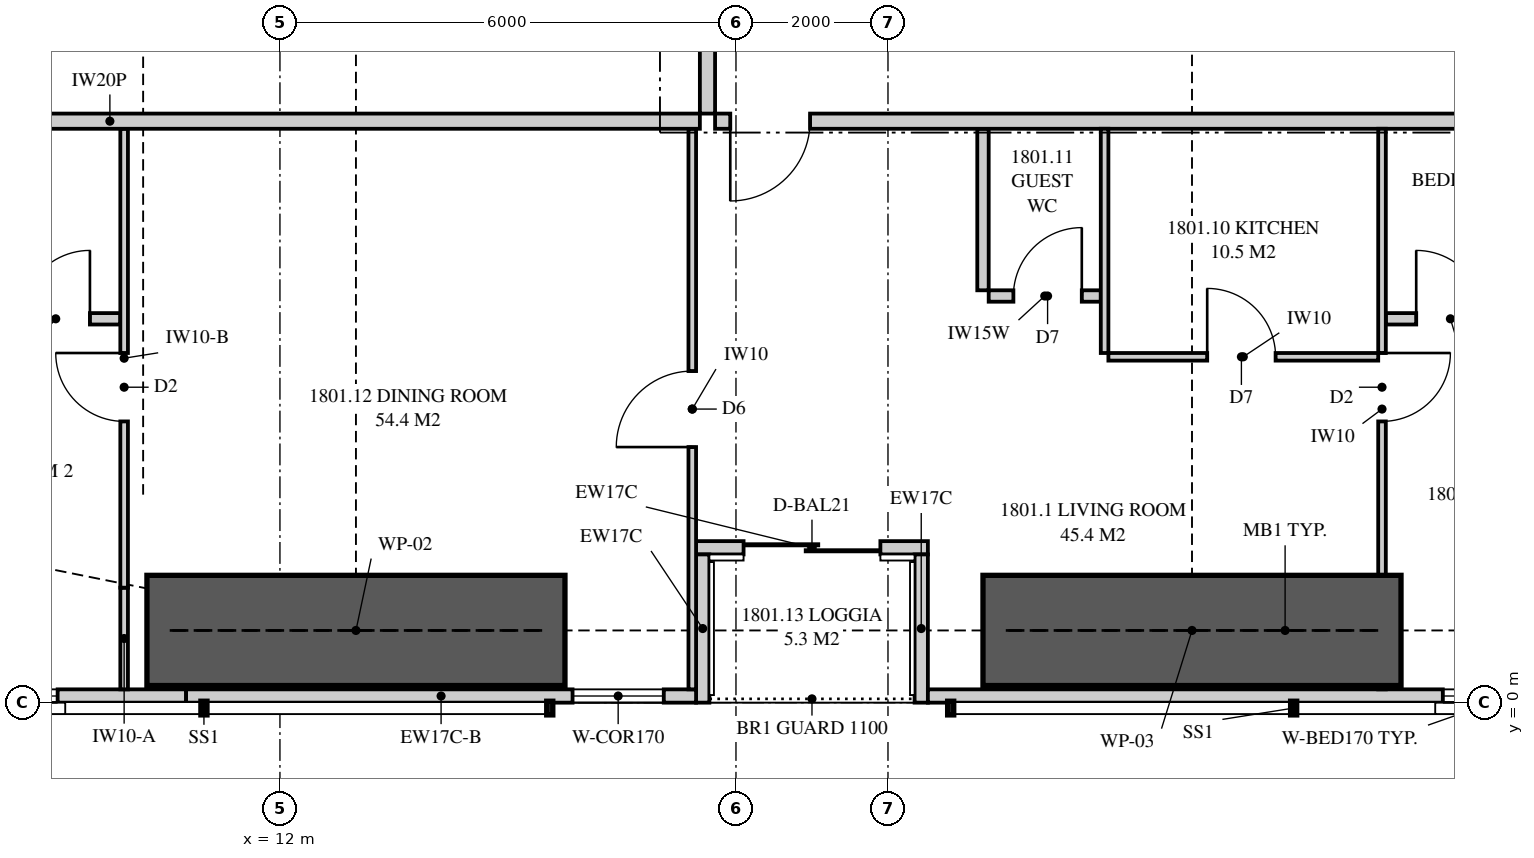
"""IFC4 building model, lengths in metres.
Left out: names, types, materials, properties, quantities, classifications, styles, units other than length and angle.
Written with IfcOpenShell. Run it as: python <this file> out.ifc"""

import sys

from ifc_helpers import new_model, si_unit, direction, frame, frame_2d, origin, place, context, subcontext, project, spatial, polyline, rectangle, outline, extrude, element, fill, save


model = new_model("IFC4")
c1 = context("Model", 3, precision=1e-05, world=origin(), true_north=direction((0.0, 1.0)))
c2 = subcontext(c1, "Body", "Model", "MODEL_VIEW")
j1 = project(units=[si_unit("LENGTHUNIT", "METRE"), si_unit("PLANEANGLEUNIT", "RADIAN")], contexts=[c1])
p1 = place(None, origin())
s1 = spatial("IfcSite", under=j1, at=p1, CompositionType="ELEMENT")
p2 = place(p1, origin())
s2 = spatial("IfcBuilding", under=s1, at=p2, CompositionType="ELEMENT")
p3 = place(p2, frame((0.0, 0.0, 67.9)))
s3 = spatial("IfcBuildingStorey", under=s2, at=p3, CompositionType="ELEMENT", Elevation=67.9)
p4 = place(p3, frame((5.051, 0.087, 0.0), z_axis=(0.0, 0.0, 1.0), x_axis=(1.0, 0.0, 0.0)))
e1 = element("IfcWall", 1, at=p4, inside=s3, PredefinedType="SOLIDWALL", context=c2, shape_type="SweptSolid", body=[
    extrude(rectangle(XDim=5.714, YDim=0.175, at=frame_2d((2.857, 0.0))), origin(), (0.0, 0.0, 1.0), 3.11),
])
p5 = place(p4, frame((2.224, 0.0, 0.4)))
e2 = element("IfcOpeningElement", 2, at=p5, cuts=e1, PredefinedType="OPENING", context=c2, shape_type="SweptSolid", body=[
    extrude(rectangle(XDim=1.8, YDim=1.7, at=frame_2d((0.9, 0.85))), frame((0.0, 0.097, 0.0), z_axis=(0.0, -1.0, 0.0), x_axis=(1.0, 0.0, 0.0)), (0.0, 0.0, 1.0), 0.195),
])
p6 = place(p3, frame((10.765, 0.087, 0.0), z_axis=(0.0, 0.0, 1.0), x_axis=(1.0, 0.0, 0.0)))
e3 = element("IfcWall", 3, at=p6, inside=s3, PredefinedType="SOLIDWALL", context=c2, shape_type="SweptSolid", body=[
    extrude(rectangle(XDim=6.71, YDim=0.175, at=frame_2d((3.355, 0.0))), origin(), (0.0, 0.0, 1.0), 2.15),
])
p7 = place(p6, frame((5.085, 0.0, 0.4)))
e4 = element("IfcOpeningElement", 4, at=p7, cuts=e3, PredefinedType="OPENING", context=c2, shape_type="SweptSolid", body=[
    extrude(rectangle(XDim=1.2, YDim=1.7, at=frame_2d((0.6, 0.85))), frame((0.0, 0.097, 0.0), z_axis=(0.0, -1.0, 0.0), x_axis=(1.0, 0.0, 0.0)), (0.0, 0.0, 1.0), 0.195),
])
p8 = place(p3, frame((20.525, 0.087, 0.0), z_axis=(0.0, 0.0, 1.0), x_axis=(1.0, 0.0, 0.0)))
e5 = element("IfcWall", 5, at=p8, inside=s3, PredefinedType="SOLIDWALL", context=c2, shape_type="SweptSolid", body=[
    extrude(rectangle(XDim=16.71, YDim=0.175, at=frame_2d((8.355, 0.0))), origin(), (0.0, 0.0, 1.0), 2.15),
])
p9 = place(p8, frame((6.775, 0.0, 0.4)))
e6 = element("IfcOpeningElement", 6, at=p9, cuts=e5, PredefinedType="OPENING", context=c2, shape_type="SweptSolid", body=[
    extrude(rectangle(XDim=1.8, YDim=1.7, at=frame_2d((0.9, 0.85))), frame((0.0, 0.097, 0.0), z_axis=(0.0, -1.0, 0.0), x_axis=(1.0, 0.0, 0.0)), (0.0, 0.0, 1.0), 0.195),
])
p10 = place(p8, frame((9.81, 0.0, 0.4)))
e7 = element("IfcOpeningElement", 7, at=p10, cuts=e5, PredefinedType="OPENING", context=c2, shape_type="SweptSolid", body=[
    extrude(rectangle(XDim=1.8, YDim=1.7, at=frame_2d((0.9, 0.85))), frame((0.0, 0.097, 0.0), z_axis=(0.0, -1.0, 0.0), x_axis=(1.0, 0.0, 0.0)), (0.0, 0.0, 1.0), 0.195),
])
p11 = place(p3, frame((17.475, 2.038, 0.0), z_axis=(0.0, 0.0, 1.0), x_axis=(1.0, 0.0, 0.0)))
e8 = element("IfcWall", 8, at=p11, inside=s3, PredefinedType="SOLIDWALL", context=c2, shape_type="SweptSolid", body=[
    extrude(rectangle(XDim=3.05, YDim=0.175, at=frame_2d((1.525, 0.0))), origin(), (0.0, 0.0, 1.0), 2.15),
])
p12 = place(p11, frame((0.625, 0.0, 0.0)))
e9 = element("IfcOpeningElement", 9, at=p12, cuts=e8, PredefinedType="OPENING", context=c2, shape_type="SweptSolid", body=[
    extrude(rectangle(XDim=1.8, YDim=2.1, at=frame_2d((0.9, 1.05))), frame((0.0, 0.097, 0.0), z_axis=(0.0, -1.0, 0.0), x_axis=(1.0, 0.0, 0.0)), (0.0, 0.0, 1.0), 0.195),
])
for number, where, z_axis, x_axis in (
    (10, (17.562, 0.0, 0.0), (0.0, 0.0, 1.0), (0.0, 1.0, 0.0)),
    (11, (20.438, 0.0, 0.0), (0.0, 0.0, 1.0), (0.0, 1.0, 0.0)),
):
    element("IfcWall", number, at=place(p3, frame(where, z_axis=z_axis, x_axis=x_axis)), inside=s3, PredefinedType="SOLIDWALL", context=c2, shape_type="SweptSolid", body=[
        extrude(rectangle(XDim=1.95, YDim=0.175, at=frame_2d((0.975, 0.0))), origin(), (0.0, 0.0, 1.0), 2.15),
    ])
p13 = place(p3, frame((17.725, 7.65, 0.0), z_axis=(0.0, 0.0, 1.0), x_axis=(1.0, 0.0, 0.0)))
e12 = element("IfcWall", 12, at=p13, inside=s3, PredefinedType="PARTITIONING", context=c2, shape_type="SweptSolid", body=[
    extrude(outline(polyline([(0.0, 0.0), (16.075, 0.0), (16.075, 3.11), (6.612, 3.11), (6.612, 2.541), (5.938, 2.541), (5.938, 3.11), (0.0, 3.11), (0.0, 0.0)])), frame((0.0, 0.1, 0.0), z_axis=(0.0, -1.0, 0.0), x_axis=(1.0, 0.0, 0.0)), (0.0, 0.0, 1.0), 0.2),
])
p14 = place(p13, frame((0.2, 0.0, 0.0)))
e13 = element("IfcOpeningElement", 13, at=p14, cuts=e12, PredefinedType="OPENING", context=c2, shape_type="SweptSolid", body=[
    extrude(rectangle(XDim=1.05, YDim=2.2, at=frame_2d((0.525, 1.1))), frame((0.0, 0.11, 0.0), z_axis=(0.0, -1.0, 0.0), x_axis=(1.0, 0.0, 0.0)), (0.0, 0.0, 1.0), 0.22),
])
p15 = place(p3, frame((9.95, 0.175, 0.0), z_axis=(0.0, 0.0, 1.0), x_axis=(0.0, 1.0, 0.0)))
e14 = element("IfcWall", 14, at=p15, inside=s3, PredefinedType="PARTITIONING", context=c2, shape_type="SweptSolid", body=[
    extrude(outline(polyline([(0.0, 0.0), (1.338, 0.0), (1.338, 2.15), (0.103, 2.15), (0.103, 3.11), (0.0, 3.11), (0.0, 0.0)])), frame((0.0, 0.05, 0.0), z_axis=(0.0, -1.0, 0.0), x_axis=(1.0, 0.0, 0.0)), (0.0, 0.0, 1.0), 0.1),
])
p16 = place(p3, frame((9.95, 1.513, 0.0), z_axis=(0.0, 0.0, 1.0), x_axis=(0.0, 1.0, 0.0)))
e15 = element("IfcWall", 15, at=p16, inside=s3, PredefinedType="PARTITIONING", context=c2, shape_type="SweptSolid", body=[
    extrude(outline(polyline([(0.0, 0.0), (6.037, 0.0), (6.037, 2.51), (1.335, 2.51), (1.335, 2.15), (0.0, 2.15), (0.0, 0.0)])), frame((0.0, 0.05, 0.0), z_axis=(0.0, -1.0, 0.0), x_axis=(1.0, 0.0, 0.0)), (0.0, 0.0, 1.0), 0.1),
])
p17 = place(p16, frame((2.188, 0.0, 0.0)))
e16 = element("IfcOpeningElement", 16, at=p17, cuts=e15, PredefinedType="OPENING", context=c2, shape_type="SweptSolid", body=[
    extrude(rectangle(XDim=0.9, YDim=2.1, at=frame_2d((0.45, 1.05))), frame((0.0, 0.06, 0.0), z_axis=(0.0, -1.0, 0.0), x_axis=(1.0, 0.0, 0.0)), (0.0, 0.0, 1.0), 0.12),
])
p18 = place(p3, frame((26.5, 0.175, 0.0), z_axis=(0.0, 0.0, 1.0), x_axis=(0.0, 1.0, 0.0)))
e17 = element("IfcWall", 17, at=p18, inside=s3, PredefinedType="PARTITIONING", context=c2, shape_type="SweptSolid", body=[
    extrude(outline(polyline([(0.0, 0.0), (7.375, 0.0), (7.375, 3.11), (2.035, 3.11), (2.035, 2.15), (0.0, 2.15), (0.0, 3.11), (0.0, 0.0)])), frame((0.0, 0.05, 0.0), z_axis=(0.0, -1.0, 0.0), x_axis=(1.0, 0.0, 0.0)), (0.0, 0.0, 1.0), 0.1),
])
p19 = place(p18, frame((3.525, 0.0, 0.0)))
e18 = element("IfcOpeningElement", 18, at=p19, cuts=e17, PredefinedType="OPENING", context=c2, shape_type="SweptSolid", body=[
    extrude(rectangle(XDim=0.9, YDim=2.1, at=frame_2d((0.45, 1.05))), frame((0.0, 0.06, 0.0), z_axis=(0.0, -1.0, 0.0), x_axis=(1.0, 0.0, 0.0)), (0.0, 0.0, 1.0), 0.12),
])
p20 = place(p3, frame((6.45, 5.05, 0.0), z_axis=(0.0, 0.0, 1.0), x_axis=(1.0, 0.0, 0.0)))
e19 = element("IfcWall", 19, at=p20, inside=s3, PredefinedType="PLUMBINGWALL", context=c2, shape_type="SweptSolid", body=[
    extrude(outline(polyline([(0.0, 0.0), (3.45, 0.0), (3.45, 3.11), (3.45, 2.51), (2.465, 2.51), (2.465, 3.11), (0.0, 3.11), (0.0, 0.0)])), frame((0.0, 0.075, 0.0), z_axis=(0.0, -1.0, 0.0), x_axis=(1.0, 0.0, 0.0)), (0.0, 0.0, 1.0), 0.15),
])
p21 = place(p20, frame((2.15, 0.0, 0.0)))
e20 = element("IfcOpeningElement", 20, at=p21, cuts=e19, PredefinedType="OPENING", context=c2, shape_type="SweptSolid", body=[
    extrude(rectangle(XDim=0.9, YDim=2.1, at=frame_2d((0.45, 1.05))), frame((0.0, 0.085, 0.0), z_axis=(0.0, -1.0, 0.0), x_axis=(1.0, 0.0, 0.0)), (0.0, 0.0, 1.0), 0.17),
])
p22 = place(p3, frame((26.55, 5.05, 0.0), z_axis=(0.0, 0.0, 1.0), x_axis=(1.0, 0.0, 0.0)))
e21 = element("IfcWall", 21, at=p22, inside=s3, PredefinedType="PLUMBINGWALL", context=c2, shape_type="SweptSolid", body=[
    extrude(rectangle(XDim=3.3, YDim=0.15, at=frame_2d((1.65, 0.0))), origin(), (0.0, 0.0, 1.0), 3.11),
])
p23 = place(p22, frame((0.4, 0.0, 0.0)))
e22 = element("IfcOpeningElement", 22, at=p23, cuts=e21, PredefinedType="OPENING", context=c2, shape_type="SweptSolid", body=[
    extrude(rectangle(XDim=0.9, YDim=2.1, at=frame_2d((0.45, 1.05))), frame((0.0, 0.085, 0.0), z_axis=(0.0, -1.0, 0.0), x_axis=(1.0, 0.0, 0.0)), (0.0, 0.0, 1.0), 0.17),
])
p24 = place(p3, frame((22.9, 4.55, 0.0), z_axis=(0.0, 0.0, 1.0), x_axis=(1.0, 0.0, 0.0)))
e23 = element("IfcWall", 23, at=p24, inside=s3, PredefinedType="PARTITIONING", context=c2, shape_type="SweptSolid", body=[
    extrude(outline(polyline([(0.0, 0.0), (3.55, 0.0), (3.55, 3.11), (1.387, 3.11), (1.387, 2.541), (0.812, 2.541), (0.812, 3.11), (0.0, 3.11), (0.0, 0.0)])), frame((0.0, 0.05, 0.0), z_axis=(0.0, -1.0, 0.0), x_axis=(1.0, 0.0, 0.0)), (0.0, 0.0, 1.0), 0.1),
])
p25 = place(p24, frame((1.3, 0.0, 0.0)))
e24 = element("IfcOpeningElement", 24, at=p25, cuts=e23, PredefinedType="OPENING", context=c2, shape_type="SweptSolid", body=[
    extrude(rectangle(XDim=0.9, YDim=2.1, at=frame_2d((0.45, 1.05))), frame((0.0, 0.06, 0.0), z_axis=(0.0, -1.0, 0.0), x_axis=(1.0, 0.0, 0.0)), (0.0, 0.0, 1.0), 0.12),
])
p26 = place(p3, frame((22.85, 4.6, 0.0), z_axis=(0.0, 0.0, 1.0), x_axis=(0.0, 1.0, 0.0)))
e25 = element("IfcWall", 25, at=p26, inside=s3, PredefinedType="PARTITIONING", context=c2, shape_type="SweptSolid", body=[
    extrude(rectangle(XDim=2.95, YDim=0.1, at=frame_2d((1.475, 0.0))), origin(), (0.0, 0.0, 1.0), 3.11),
])
p27 = place(p3, frame((21.325, 5.35, 0.0), z_axis=(0.0, 0.0, 1.0), x_axis=(1.0, 0.0, 0.0)))
e26 = element("IfcWall", 26, at=p27, inside=s3, PredefinedType="PLUMBINGWALL", context=c2, shape_type="SweptSolid", body=[
    extrude(rectangle(XDim=1.475, YDim=0.15, at=frame_2d((0.738, 0.0))), origin(), (0.0, 0.0, 1.0), 3.11),
])
p28 = place(p27, frame((0.325, 0.0, 0.0)))
e27 = element("IfcOpeningElement", 27, at=p28, cuts=e26, PredefinedType="OPENING", context=c2, shape_type="SweptSolid", body=[
    extrude(rectangle(XDim=0.9, YDim=2.1, at=frame_2d((0.45, 1.05))), frame((0.0, 0.085, 0.0), z_axis=(0.0, -1.0, 0.0), x_axis=(1.0, 0.0, 0.0)), (0.0, 0.0, 1.0), 0.17),
])
p29 = place(p3, frame((21.25, 5.425, 0.0), z_axis=(0.0, 0.0, 1.0), x_axis=(0.0, 1.0, 0.0)))
e28 = element("IfcWall", 28, at=p29, inside=s3, PredefinedType="PLUMBINGWALL", context=c2, shape_type="SweptSolid", body=[
    extrude(rectangle(XDim=2.125, YDim=0.15, at=frame_2d((1.062, 0.0))), origin(), (0.0, 0.0, 1.0), 3.11),
])
p30 = place(p3, frame((17.425, 0.175, 0.0), z_axis=(0.0, 0.0, 1.0), x_axis=(0.0, 1.0, 0.0)))
e29 = element("IfcWall", 29, at=p30, inside=s3, PredefinedType="PARTITIONING", context=c2, shape_type="SweptSolid", body=[
    extrude(outline(polyline([(0.0, 0.0), (7.375, 0.0), (7.375, 3.11), (2.035, 3.11), (2.035, 2.15), (0.0, 2.15), (0.0, 3.11), (0.0, 0.0)])), frame((0.0, 0.05, 0.0), z_axis=(0.0, -1.0, 0.0), x_axis=(1.0, 0.0, 0.0)), (0.0, 0.0, 1.0), 0.1),
])
p31 = place(p30, frame((3.188, 0.0, 0.0)))
e30 = element("IfcOpeningElement", 30, at=p31, cuts=e29, PredefinedType="OPENING", context=c2, shape_type="SweptSolid", body=[
    extrude(rectangle(XDim=1.0, YDim=2.1, at=frame_2d((0.5, 1.05))), frame((0.0, 0.06, 0.0), z_axis=(0.0, -1.0, 0.0), x_axis=(1.0, 0.0, 0.0)), (0.0, 0.0, 1.0), 0.12),
])
p32 = place(p3, frame((2.0, 7.65, 0.0), z_axis=(0.0, 0.0, 1.0), x_axis=(1.0, 0.0, 0.0)))
e31 = element("IfcWall", 31, at=p32, inside=s3, PredefinedType="PARTITIONING", context=c2, shape_type="SweptSolid", body=[
    extrude(outline(polyline([(0.0, 0.0), (15.525, 0.0), (15.525, 3.11), (11.337, 3.11), (11.337, 2.541), (10.663, 2.541), (10.663, 3.11), (9.51, 3.11), (9.51, 2.51), (6.89, 2.51), (6.89, 3.11), (3.145, 3.11), (3.145, 2.15), (0.49, 2.15), (0.49, 3.11), (0.0, 3.11), (0.0, 0.0)])), frame((0.0, 0.1, 0.0), z_axis=(0.0, -1.0, 0.0), x_axis=(1.0, 0.0, 0.0)), (0.0, 0.0, 1.0), 0.2),
])
p33 = place(p3, frame((17.625, 7.75, 0.0), z_axis=(0.0, 0.0, 1.0), x_axis=(0.0, 1.0, 0.0)))
e32 = element("IfcWall", 32, at=p33, inside=s3, PredefinedType="PARTITIONING", context=c2, shape_type="SweptSolid", body=[
    extrude(outline(polyline([(0.0, 0.0), (6.15, 0.0), (6.15, 3.11), (5.587, 3.11), (5.587, 2.541), (4.913, 2.541), (4.913, 3.11), (0.0, 3.11), (0.0, 0.0)])), frame((0.0, 0.1, 0.0), z_axis=(0.0, -1.0, 0.0), x_axis=(1.0, 0.0, 0.0)), (0.0, 0.0, 1.0), 0.2),
])
p34 = place(p33, frame((2.175, 0.0, 0.0)))
e33 = element("IfcOpeningElement", 33, at=p34, cuts=e32, PredefinedType="OPENING", context=c2, shape_type="SweptSolid", body=[
    extrude(rectangle(XDim=1.8, YDim=2.1, at=frame_2d((0.9, 1.05))), frame((0.0, 0.11, 0.0), z_axis=(0.0, -1.0, 0.0), x_axis=(1.0, 0.0, 0.0)), (0.0, 0.0, 1.0), 0.22),
])
for number, where, z_axis, x_axis in (
    (34, (10.25, 0.95, 0.0), (0.0, 0.0, 1.0), (1.0, 0.0, 0.0)),
    (35, (21.25, 0.95, 0.0), (0.0, 0.0, 1.0), (1.0, 0.0, 0.0)),
):
    element("IfcWall", number, at=place(p3, frame(where, z_axis=z_axis, x_axis=x_axis)), inside=s3, PredefinedType="SHEAR", context=c2, shape_type="SweptSolid", body=[
        extrude(rectangle(XDim=5.5, YDim=1.45, at=frame_2d((2.75, 0.0))), origin(), (0.0, 0.0, 1.0), 3.35),
    ])
p35 = place(p5, origin())
e36 = element("IfcWindow", 36, at=p35, inside=s3, PartitioningType="SINGLE_PANEL", PredefinedType="WINDOW", context=c2, shape_type="SweptSolid", body=[
    extrude(rectangle(XDim=1.8, YDim=1.7, at=frame_2d((0.9, 0.85))), frame((0.0, 0.03, 0.0), z_axis=(0.0, -1.0, 0.0), x_axis=(1.0, 0.0, 0.0)), (0.0, 0.0, 1.0), 0.06),
])
fill(e2, e36)
p36 = place(p7, origin())
e37 = element("IfcWindow", 37, at=p36, inside=s3, PartitioningType="SINGLE_PANEL", PredefinedType="WINDOW", context=c2, shape_type="SweptSolid", body=[
    extrude(rectangle(XDim=1.2, YDim=1.7, at=frame_2d((0.6, 0.85))), frame((0.0, 0.03, 0.0), z_axis=(0.0, -1.0, 0.0), x_axis=(1.0, 0.0, 0.0)), (0.0, 0.0, 1.0), 0.06),
])
fill(e4, e37)
p37 = place(p12, origin())
e38 = element("IfcDoor", 38, at=p37, inside=s3, OperationType="SLIDING_TO_LEFT", PredefinedType="DOOR", context=c2, shape_type="SweptSolid", body=[
    extrude(rectangle(XDim=1.8, YDim=2.1, at=frame_2d((0.9, 1.05))), frame((0.0, 0.025, 0.0), z_axis=(0.0, -1.0, 0.0), x_axis=(1.0, 0.0, 0.0)), (0.0, 0.0, 1.0), 0.05),
])
fill(e9, e38)
p38 = place(p9, origin())
e39 = element("IfcWindow", 39, at=p38, inside=s3, PartitioningType="SINGLE_PANEL", PredefinedType="WINDOW", context=c2, shape_type="SweptSolid", body=[
    extrude(rectangle(XDim=1.8, YDim=1.7, at=frame_2d((0.9, 0.85))), frame((0.0, 0.03, 0.0), z_axis=(0.0, -1.0, 0.0), x_axis=(1.0, 0.0, 0.0)), (0.0, 0.0, 1.0), 0.06),
])
fill(e6, e39)
p39 = place(p14, frame((1.05, 0.0, 0.0), z_axis=(0.0, 0.0, 1.0), x_axis=(-1.0, 0.0, 0.0)))
e40 = element("IfcDoor", 40, at=p39, inside=s3, OperationType="SINGLE_SWING_RIGHT", PredefinedType="DOOR", context=c2, shape_type="SweptSolid", body=[
    extrude(rectangle(XDim=1.05, YDim=2.2, at=frame_2d((0.525, 1.1))), frame((0.0, 0.025, 0.0), z_axis=(0.0, -1.0, 0.0), x_axis=(1.0, 0.0, 0.0)), (0.0, 0.0, 1.0), 0.05),
])
fill(e13, e40)
p40 = place(p17, origin())
e41 = element("IfcDoor", 41, at=p40, inside=s3, OperationType="SINGLE_SWING_RIGHT", PredefinedType="DOOR", context=c2, shape_type="SweptSolid", body=[
    extrude(rectangle(XDim=0.9, YDim=2.1, at=frame_2d((0.45, 1.05))), frame((0.0, 0.025, 0.0), z_axis=(0.0, -1.0, 0.0), x_axis=(1.0, 0.0, 0.0)), (0.0, 0.0, 1.0), 0.05),
])
fill(e16, e41)
p41 = place(p21, origin())
e42 = element("IfcDoor", 42, at=p41, inside=s3, OperationType="SINGLE_SWING_RIGHT", PredefinedType="DOOR", context=c2, shape_type="SweptSolid", body=[
    extrude(rectangle(XDim=0.9, YDim=2.1, at=frame_2d((0.45, 1.05))), frame((0.0, 0.025, 0.0), z_axis=(0.0, -1.0, 0.0), x_axis=(1.0, 0.0, 0.0)), (0.0, 0.0, 1.0), 0.05),
])
fill(e20, e42)
p42 = place(p19, frame((0.9, 0.0, 0.0), z_axis=(0.0, 0.0, 1.0), x_axis=(-1.0, 0.0, 0.0)))
e43 = element("IfcDoor", 43, at=p42, inside=s3, OperationType="SINGLE_SWING_LEFT", PredefinedType="DOOR", context=c2, shape_type="SweptSolid", body=[
    extrude(rectangle(XDim=0.9, YDim=2.1, at=frame_2d((0.45, 1.05))), frame((0.0, 0.025, 0.0), z_axis=(0.0, -1.0, 0.0), x_axis=(1.0, 0.0, 0.0)), (0.0, 0.0, 1.0), 0.05),
])
fill(e18, e43)
p43 = place(p23, origin())
e44 = element("IfcDoor", 44, at=p43, inside=s3, OperationType="SINGLE_SWING_LEFT", PredefinedType="DOOR", context=c2, shape_type="SweptSolid", body=[
    extrude(rectangle(XDim=0.9, YDim=2.1, at=frame_2d((0.45, 1.05))), frame((0.0, 0.025, 0.0), z_axis=(0.0, -1.0, 0.0), x_axis=(1.0, 0.0, 0.0)), (0.0, 0.0, 1.0), 0.05),
])
fill(e22, e44)
p44 = place(p25, origin())
e45 = element("IfcDoor", 45, at=p44, inside=s3, OperationType="SINGLE_SWING_LEFT", PredefinedType="DOOR", context=c2, shape_type="SweptSolid", body=[
    extrude(rectangle(XDim=0.9, YDim=2.1, at=frame_2d((0.45, 1.05))), frame((0.0, 0.025, 0.0), z_axis=(0.0, -1.0, 0.0), x_axis=(1.0, 0.0, 0.0)), (0.0, 0.0, 1.0), 0.05),
])
fill(e24, e45)
p45 = place(p28, origin())
e46 = element("IfcDoor", 46, at=p45, inside=s3, OperationType="SINGLE_SWING_RIGHT", PredefinedType="DOOR", context=c2, shape_type="SweptSolid", body=[
    extrude(rectangle(XDim=0.9, YDim=2.1, at=frame_2d((0.45, 1.05))), frame((0.0, 0.025, 0.0), z_axis=(0.0, -1.0, 0.0), x_axis=(1.0, 0.0, 0.0)), (0.0, 0.0, 1.0), 0.05),
])
fill(e27, e46)
p46 = place(p31, origin())
e47 = element("IfcDoor", 47, at=p46, inside=s3, OperationType="SINGLE_SWING_LEFT", PredefinedType="DOOR", context=c2, shape_type="SweptSolid", body=[
    extrude(rectangle(XDim=1.0, YDim=2.1, at=frame_2d((0.5, 1.05))), frame((0.0, 0.025, 0.0), z_axis=(0.0, -1.0, 0.0), x_axis=(1.0, 0.0, 0.0)), (0.0, 0.0, 1.0), 0.05),
])
fill(e30, e47)
save(model, sys.argv[1])
